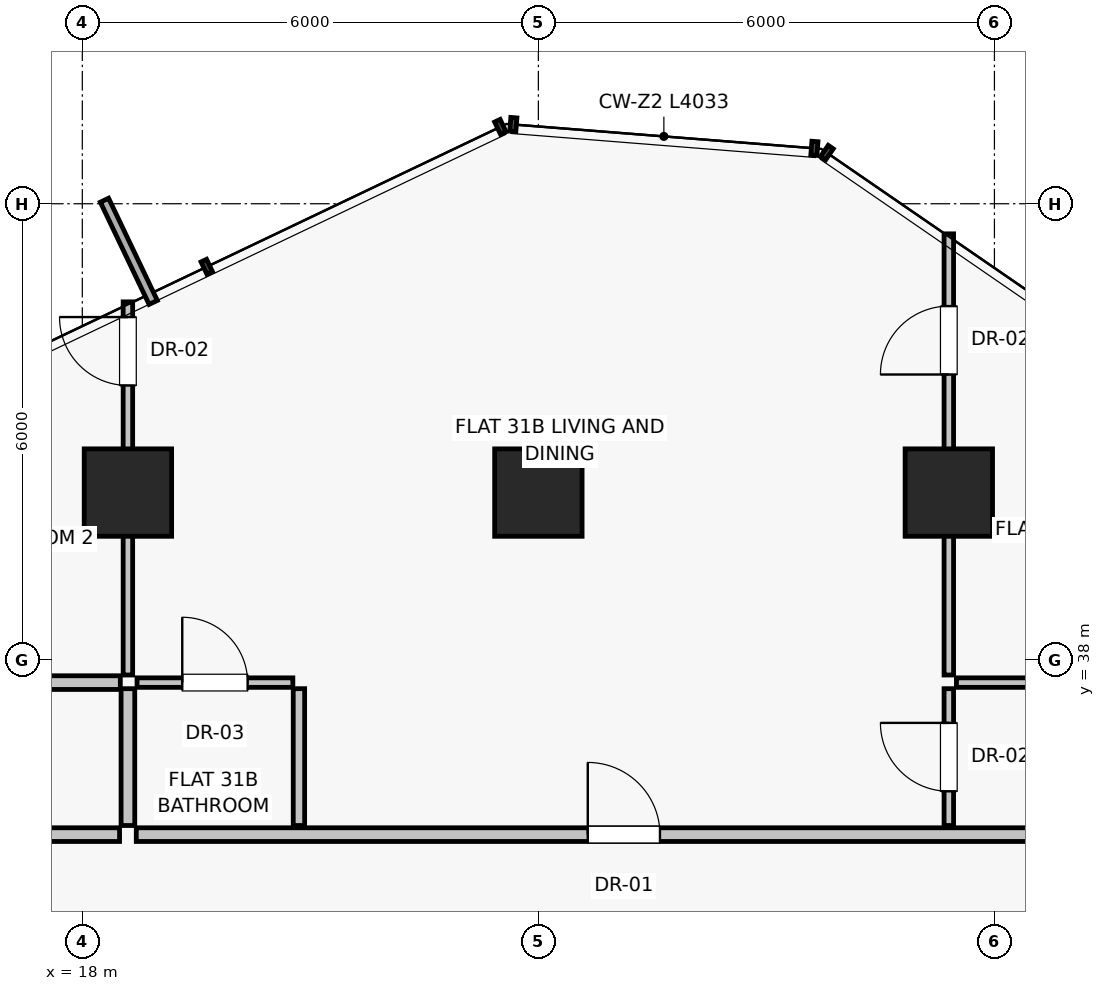
"""IFC4 building model, lengths in metres.
Left out: names, types, materials, properties, quantities, classifications, styles, units other than length and angle.
Written with IfcOpenShell. Run it as: python <this file> out.ifc"""

import sys

from ifc_helpers import new_model, si_unit, direction, frame, frame_2d, origin, origin_2d, place, context, subcontext, project, spatial, rectangle, extrude, source, transform, mapped, element, fill, save


model = new_model("IFC4")
c1 = context("Model", 3, precision=1e-05, world=origin(), true_north=direction((0.0, 1.0)))
c2 = subcontext(c1, "Body", "Model", "MODEL_VIEW")
j1 = project(units=[si_unit("LENGTHUNIT", "METRE"), si_unit("PLANEANGLEUNIT", "RADIAN")], contexts=[c1])
p1 = place(None, origin())
s1 = spatial("IfcSite", under=j1, at=p1, CompositionType="ELEMENT")
p2 = place(p1, origin())
s2 = spatial("IfcBuilding", under=s1, at=p2, CompositionType="ELEMENT")
p3 = place(p2, frame((0.0, 0.0, 113.25)))
s3 = spatial("IfcBuildingStorey", under=s2, at=p3, CompositionType="ELEMENT", Elevation=113.25)
for number, where, z_axis, x_axis in (
    (1, (29.4, 40.2, 0.0), (0.0, 0.0, 1.0), (1.0, 0.0, 0.0)),
    (2, (24.0, 40.2, 0.0), (0.0, 0.0, 1.0), (1.0, 0.0, 0.0)),
    (3, (18.6, 40.2, 0.0), (0.0, 0.0, 1.0), (1.0, 0.0, 0.0)),
):
    element("IfcColumn", number, at=place(p3, frame(where, z_axis=z_axis, x_axis=x_axis)), inside=s3, PredefinedType="COLUMN", context=c2, shape_type="SweptSolid", body=[
        extrude(rectangle(XDim=1.15, YDim=1.15, at=origin_2d()), origin(), (0.0, 0.0, 1.0), 3.25),
    ])
p4 = place(p3, frame((14.51, 35.7, 0.0), z_axis=(0.0, 0.0, 1.0), x_axis=(1.0, 0.0, 0.0)))
e4 = element("IfcWall", 4, at=p4, inside=s3, PredefinedType="PARTITIONING", context=c2, shape_type="SweptSolid", body=[
    extrude(rectangle(XDim=3.98, YDim=0.18, at=frame_2d((1.99, 0.0))), origin(), (0.0, 0.0, 1.0), 2.58),
])
p5 = place(p4, frame((1.49, 0.0, 0.0)))
e5 = element("IfcOpeningElement", 5, at=p5, cuts=e4, PredefinedType="OPENING", context=c2, shape_type="SweptSolid", body=[
    extrude(rectangle(XDim=1.0, YDim=2.01, at=frame_2d((0.5, 1.005))), frame((0.0, 0.1, 0.0), z_axis=(0.0, -1.0, 0.0), x_axis=(1.0, 0.0, 0.0)), (0.0, 0.0, 1.0), 0.2),
])
p6 = place(p3, frame((18.71, 35.7, 0.0), z_axis=(0.0, 0.0, 1.0), x_axis=(1.0, 0.0, 0.0)))
e6 = element("IfcWall", 6, at=p6, inside=s3, PredefinedType="PARTITIONING", context=c2, shape_type="SweptSolid", body=[
    extrude(rectangle(XDim=14.78, YDim=0.18, at=frame_2d((7.39, 0.0))), origin(), (0.0, 0.0, 1.0), 2.58),
])
p7 = place(p6, frame((5.94, 0.0, 0.0)))
e7 = element("IfcOpeningElement", 7, at=p7, cuts=e6, PredefinedType="OPENING", context=c2, shape_type="SweptSolid", body=[
    extrude(rectangle(XDim=0.95, YDim=2.02, at=frame_2d((0.475, 1.01))), frame((0.0, 0.1, 0.0), z_axis=(0.0, -1.0, 0.0), x_axis=(1.0, 0.0, 0.0)), (0.0, 0.0, 1.0), 0.2),
])
p8 = place(p3, frame((14.52, 37.7, 0.0), z_axis=(0.0, 0.0, 1.0), x_axis=(1.0, 0.0, 0.0)))
e8 = element("IfcWall", 8, at=p8, inside=s3, PredefinedType="PARTITIONING", context=c2, shape_type="SweptSolid", body=[
    extrude(rectangle(XDim=3.98, YDim=0.18, at=frame_2d((1.99, 0.0))), origin(), (0.0, 0.0, 1.0), 3.0),
])
p9 = place(p3, frame((18.6, 35.82, 0.0), z_axis=(0.0, 0.0, 1.0), x_axis=(0.0, 1.0, 0.0)))
e9 = element("IfcWall", 9, at=p9, inside=s3, PredefinedType="PARTITIONING", context=c2, shape_type="SweptSolid", body=[
    extrude(rectangle(XDim=1.8, YDim=0.18, at=frame_2d((0.9, 0.0))), origin(), (0.0, 0.0, 1.0), 2.378),
])
p10 = place(p3, frame((18.6, 37.8, 0.0), z_axis=(0.0, 0.0, 1.0), x_axis=(0.0, 1.0, 0.0)))
e10 = element("IfcWall", 10, at=p10, inside=s3, PredefinedType="PARTITIONING", context=c2, shape_type="SweptSolid", body=[
    extrude(rectangle(XDim=4.909, YDim=0.125, at=frame_2d((2.455, 0.0))), origin(), (0.0, 0.0, 1.0), 2.378),
])
p11 = place(p10, frame((3.809, 0.0, 0.0)))
e11 = element("IfcOpeningElement", 11, at=p11, cuts=e10, PredefinedType="OPENING", context=c2, shape_type="SweptSolid", body=[
    extrude(rectangle(XDim=0.9, YDim=2.01, at=frame_2d((0.45, 1.005))), frame((0.0, 0.073, 0.0), z_axis=(0.0, -1.0, 0.0), x_axis=(1.0, 0.0, 0.0)), (0.0, 0.0, 1.0), 0.145),
])
p12 = place(p3, frame((20.85, 35.82, 0.0), z_axis=(0.0, 0.0, 1.0), x_axis=(0.0, 1.0, 0.0)))
e12 = element("IfcWall", 12, at=p12, inside=s3, PredefinedType="PARTITIONING", context=c2, shape_type="SweptSolid", body=[
    extrude(rectangle(XDim=1.8, YDim=0.15, at=frame_2d((0.9, 0.0))), origin(), (0.0, 0.0, 1.0), 3.0),
])
p13 = place(p3, frame((18.72, 37.7, 0.0), z_axis=(0.0, 0.0, 1.0), x_axis=(1.0, 0.0, 0.0)))
e13 = element("IfcWall", 13, at=p13, inside=s3, PredefinedType="PARTITIONING", context=c2, shape_type="SweptSolid", body=[
    extrude(rectangle(XDim=2.05, YDim=0.125, at=frame_2d((1.025, 0.0))), origin(), (0.0, 0.0, 1.0), 3.0),
])
p14 = place(p13, frame((0.595, 0.0, 0.0)))
e14 = element("IfcOpeningElement", 14, at=p14, cuts=e13, PredefinedType="OPENING", context=c2, shape_type="SweptSolid", body=[
    extrude(rectangle(XDim=0.86, YDim=2.01, at=frame_2d((0.43, 1.005))), frame((0.0, 0.073, 0.0), z_axis=(0.0, -1.0, 0.0), x_axis=(1.0, 0.0, 0.0)), (0.0, 0.0, 1.0), 0.145),
])
p15 = place(p3, frame((29.4, 35.82, 0.0), z_axis=(0.0, 0.0, 1.0), x_axis=(0.0, 1.0, 0.0)))
e15 = element("IfcWall", 15, at=p15, inside=s3, PredefinedType="PARTITIONING", context=c2, shape_type="SweptSolid", body=[
    extrude(rectangle(XDim=1.8, YDim=0.125, at=frame_2d((0.9, 0.0))), origin(), (0.0, 0.0, 1.0), 2.378),
])
p16 = place(p15, frame((0.45, 0.0, 0.0)))
e16 = element("IfcOpeningElement", 16, at=p16, cuts=e15, PredefinedType="OPENING", context=c2, shape_type="SweptSolid", body=[
    extrude(rectangle(XDim=0.9, YDim=2.01, at=frame_2d((0.45, 1.005))), frame((0.0, 0.073, 0.0), z_axis=(0.0, -1.0, 0.0), x_axis=(1.0, 0.0, 0.0)), (0.0, 0.0, 1.0), 0.145),
])
p17 = place(p3, frame((29.5, 37.7, 0.0), z_axis=(0.0, 0.0, 1.0), x_axis=(1.0, 0.0, 0.0)))
e17 = element("IfcWall", 17, at=p17, inside=s3, PredefinedType="PARTITIONING", context=c2, shape_type="SweptSolid", body=[
    extrude(rectangle(XDim=3.98, YDim=0.125, at=frame_2d((1.99, 0.0))), origin(), (0.0, 0.0, 1.0), 3.0),
])
p18 = place(p3, frame((29.4, 37.8, 0.0), z_axis=(0.0, 0.0, 1.0), x_axis=(0.0, 1.0, 0.0)))
e18 = element("IfcWall", 18, at=p18, inside=s3, PredefinedType="PARTITIONING", context=c2, shape_type="SweptSolid", body=[
    extrude(rectangle(XDim=5.804, YDim=0.125, at=frame_2d((2.902, 0.0))), origin(), (0.0, 0.0, 1.0), 2.378),
])
p19 = place(p18, frame((3.953, 0.0, 0.0)))
e19 = element("IfcOpeningElement", 19, at=p19, cuts=e18, PredefinedType="OPENING", context=c2, shape_type="SweptSolid", body=[
    extrude(rectangle(XDim=0.9, YDim=2.01, at=frame_2d((0.45, 1.005))), frame((0.0, 0.073, 0.0), z_axis=(0.0, -1.0, 0.0), x_axis=(1.0, 0.0, 0.0)), (0.0, 0.0, 1.0), 0.145),
])
m1 = source(origin(), c2, "Body", "SweptSolid", [
    extrude(rectangle(XDim=0.95, YDim=2.02, at=frame_2d((0.475, 1.01))), frame((0.0, 0.025, 0.0), z_axis=(0.0, -1.0, 0.0), x_axis=(1.0, 0.0, 0.0)), (0.0, 0.0, 1.0), 0.05),
])
p20 = place(p7, origin())
e20 = element("IfcDoor", 20, at=p20, inside=s3, OperationType="SINGLE_SWING_LEFT", PredefinedType="DOOR", context=c2, shape_type="MappedRepresentation", body=[
    mapped(m1, transform((0.0, 0.0, 0.0), scale=1.0)),
])
fill(e7, e20)
m2 = source(origin(), c2, "Body", "SweptSolid", [
    extrude(rectangle(XDim=0.9, YDim=2.01, at=frame_2d((0.45, 1.005))), frame((0.0, 0.025, 0.0), z_axis=(0.0, -1.0, 0.0), x_axis=(1.0, 0.0, 0.0)), (0.0, 0.0, 1.0), 0.05),
])
p21 = place(p11, origin())
e21 = element("IfcDoor", 21, at=p21, inside=s3, OperationType="SINGLE_SWING_RIGHT", PredefinedType="DOOR", context=c2, shape_type="MappedRepresentation", body=[
    mapped(m2, transform((0.0, 0.0, 0.0), scale=1.0)),
])
fill(e11, e21)
m3 = source(origin(), c2, "Body", "SweptSolid", [
    extrude(rectangle(XDim=0.86, YDim=2.01, at=frame_2d((0.43, 1.005))), frame((0.0, 0.025, 0.0), z_axis=(0.0, -1.0, 0.0), x_axis=(1.0, 0.0, 0.0)), (0.0, 0.0, 1.0), 0.05),
])
p22 = place(p14, origin())
e22 = element("IfcDoor", 22, at=p22, inside=s3, OperationType="SINGLE_SWING_LEFT", PredefinedType="DOOR", context=c2, shape_type="MappedRepresentation", body=[
    mapped(m3, transform((0.0, 0.0, 0.0), scale=1.0)),
])
fill(e14, e22)
p23 = place(p16, origin())
e23 = element("IfcDoor", 23, at=p23, inside=s3, OperationType="SINGLE_SWING_RIGHT", PredefinedType="DOOR", context=c2, shape_type="MappedRepresentation", body=[
    mapped(m2, transform((0.0, 0.0, 0.0), scale=1.0)),
])
fill(e16, e23)
p24 = place(p19, origin())
e24 = element("IfcDoor", 24, at=p24, inside=s3, OperationType="SINGLE_SWING_LEFT", PredefinedType="DOOR", context=c2, shape_type="MappedRepresentation", body=[
    mapped(m2, transform((0.0, 0.0, 0.0), scale=1.0)),
])
fill(e19, e24)
save(model, sys.argv[1])
